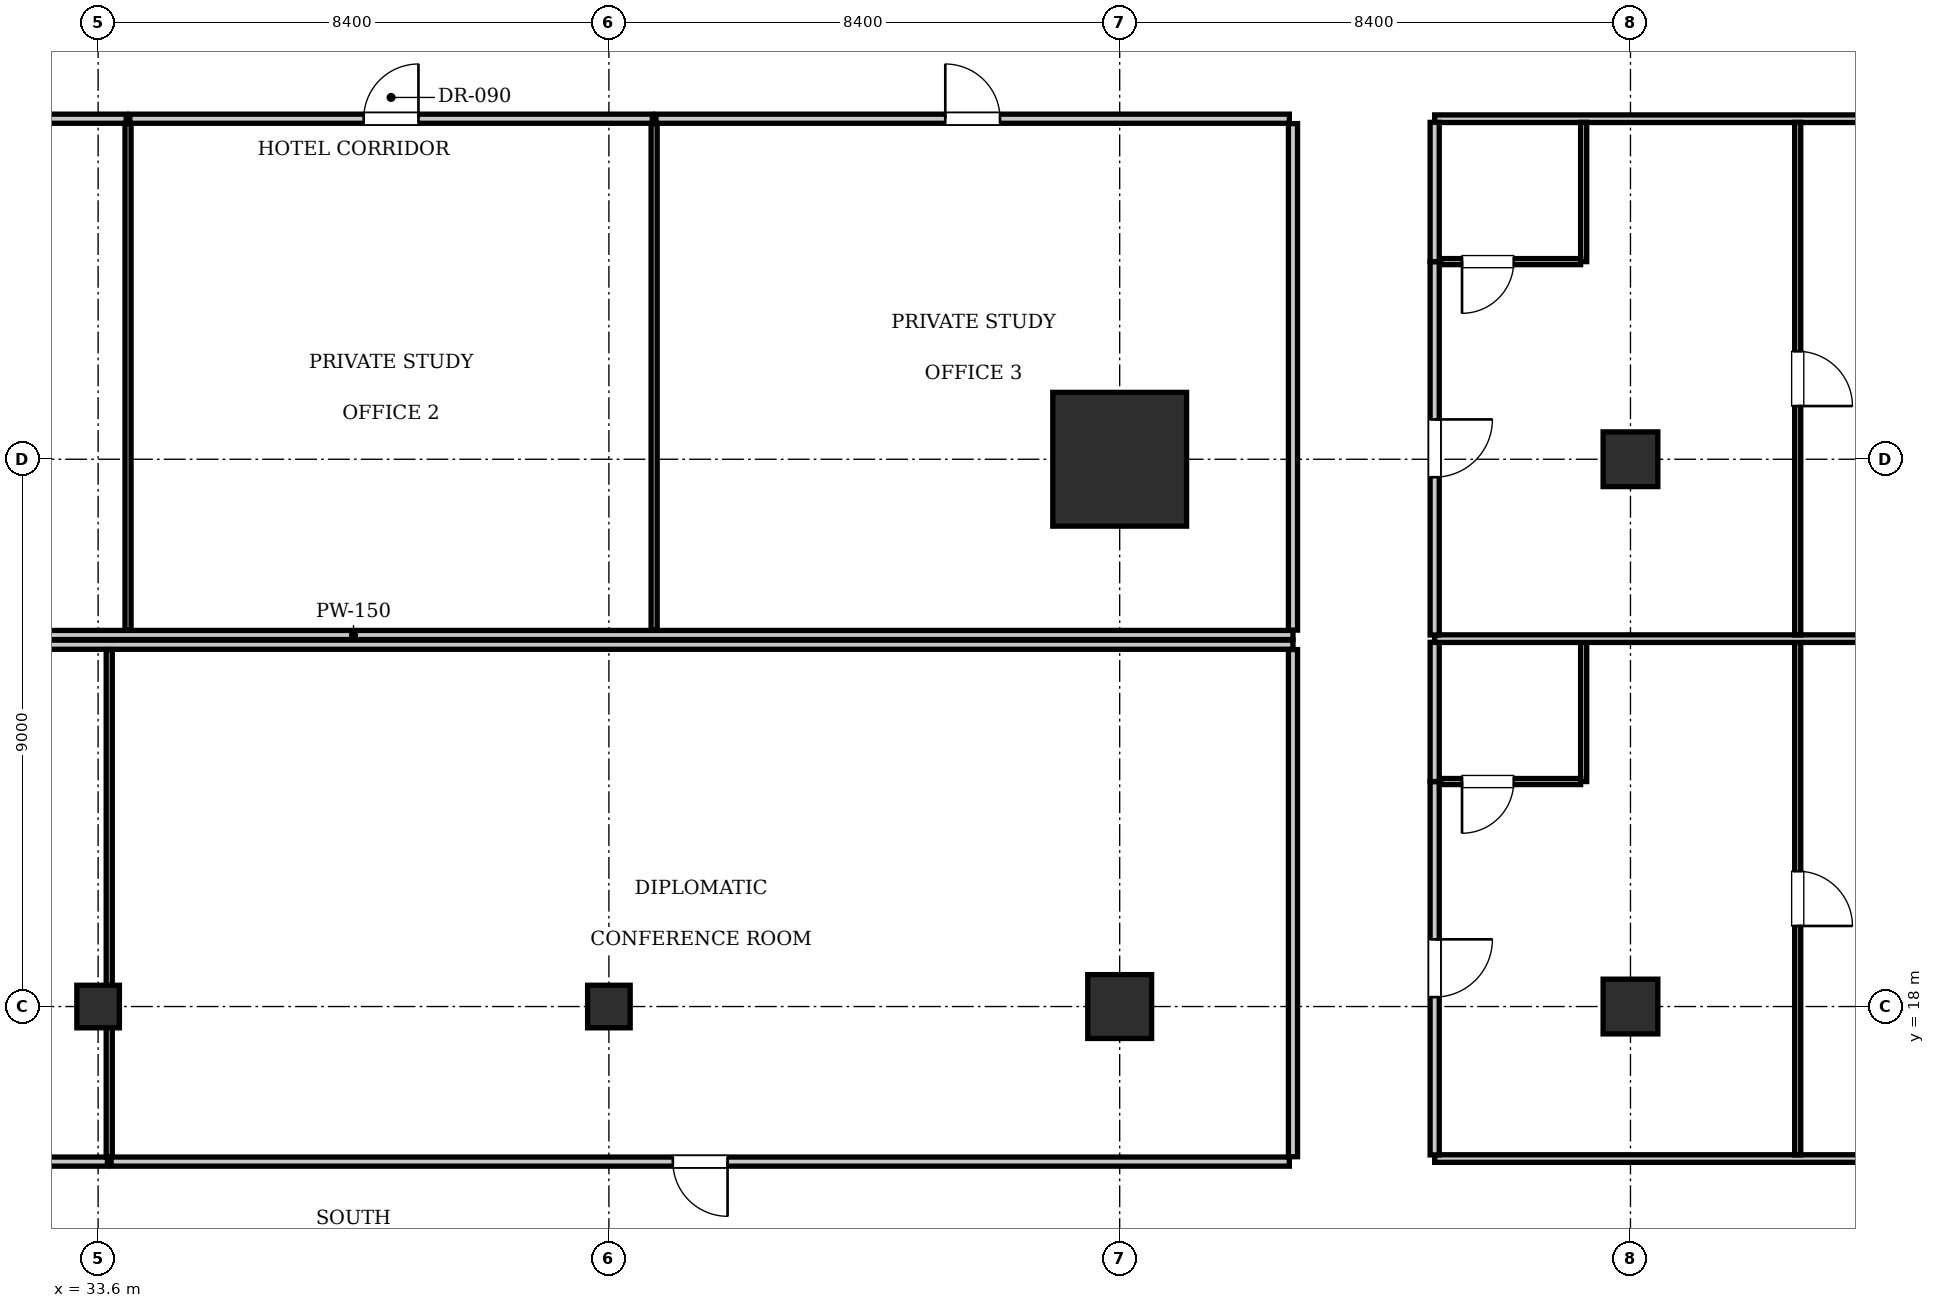
"""IFC4 building model, lengths in metres.
Left out: names, types, materials, properties, quantities, classifications, styles, units other than length and angle.
Written with IfcOpenShell. Run it as: python <this file> out.ifc"""

import sys

from ifc_helpers import new_model, si_unit, direction, frame, frame_2d, origin, origin_2d, place, context, subcontext, project, spatial, rectangle, i_section, extrude, element, fill, save


model = new_model("IFC4")
c1 = context("Model", 3, precision=1e-05, world=origin(), true_north=direction((0.0, 1.0)))
c2 = subcontext(c1, "Body", "Model", "MODEL_VIEW")
j1 = project(units=[si_unit("LENGTHUNIT", "METRE"), si_unit("PLANEANGLEUNIT", "RADIAN")], contexts=[c1])
p1 = place(None, origin())
s1 = spatial("IfcSite", under=j1, at=p1, CompositionType="ELEMENT")
p2 = place(p1, origin())
s2 = spatial("IfcBuilding", under=s1, at=p2, CompositionType="ELEMENT")
p3 = place(p2, frame((0.0, 0.0, 73.15)))
s3 = spatial("IfcBuildingStorey", under=s2, at=p3, CompositionType="ELEMENT", Elevation=73.15)
p4 = place(p3, frame((50.4, 27.0, 0.0), z_axis=(0.0, 0.0, 1.0), x_axis=(1.0, 0.0, 0.0)))
e1 = element("IfcColumn", 1, at=p4, inside=s3, PredefinedType="COLUMN", context=c2, shape_type="SweptSolid", body=[
    extrude(rectangle(XDim=2.2, YDim=2.2, at=origin_2d()), origin(), (0.0, 0.0, 1.0), 3.85),
])
p5 = place(p3, frame((50.4, 18.0, 0.0), z_axis=(0.0, 0.0, 1.0), x_axis=(1.0, 0.0, 0.0)))
e2 = element("IfcColumn", 2, at=p5, inside=s3, PredefinedType="COLUMN", context=c2, shape_type="SweptSolid", body=[
    extrude(rectangle(XDim=1.05, YDim=1.05, at=origin_2d()), origin(), (0.0, 0.0, 1.0), 3.85),
])
for number, where, z_axis, x_axis in (
    (3, (33.6, 18.0, 0.0), (0.0, 0.0, 1.0), (1.0, 0.0, 0.0)),
    (4, (42.0, 18.0, 0.0), (0.0, 0.0, 1.0), (1.0, 0.0, 0.0)),
):
    element("IfcColumn", number, at=place(p3, frame(where, z_axis=z_axis, x_axis=x_axis)), inside=s3, PredefinedType="COLUMN", context=c2, shape_type="SweptSolid", body=[
        extrude(i_section(OverallWidth=0.7, OverallDepth=0.7, WebThickness=0.028, FlangeThickness=0.044, at=origin_2d()), origin(), (0.0, 0.0, 1.0), 3.85),
    ])
for number, where, z_axis, x_axis in (
    (5, (58.8, 18.0, 0.0), (0.0, 0.0, 1.0), (1.0, 0.0, 0.0)),
    (6, (58.8, 27.0, 0.0), (0.0, 0.0, 1.0), (1.0, 0.0, 0.0)),
):
    element("IfcColumn", number, at=place(p3, frame(where, z_axis=z_axis, x_axis=x_axis)), inside=s3, PredefinedType="COLUMN", context=c2, shape_type="SweptSolid", body=[
        extrude(rectangle(XDim=0.9, YDim=0.9, at=origin_2d()), origin(), (0.0, 0.0, 1.0), 3.85),
    ])
p6 = place(p3, frame((22.35, 24.11, 0.0), z_axis=(0.0, 0.0, 1.0), x_axis=(1.0, 0.0, 0.0)))
e7 = element("IfcWall", 7, at=p6, inside=s3, PredefinedType="PARTITIONING", context=c2, shape_type="SweptSolid", body=[
    extrude(rectangle(XDim=30.9, YDim=0.15, at=frame_2d((15.45, 0.0))), origin(), (0.0, 0.0, 1.0), 3.61),
])
p7 = place(p3, frame((53.25, 24.19, 0.0), z_axis=(0.0, 0.0, 1.0), x_axis=(0.0, 1.0, 0.0)))
e8 = element("IfcWall", 8, at=p7, inside=s3, PredefinedType="PARTITIONING", context=c2, shape_type="SweptSolid", body=[
    extrude(rectangle(XDim=8.33, YDim=0.15, at=frame_2d((4.165, 0.0))), origin(), (0.0, 0.0, 1.0), 3.61),
])
p8 = place(p3, frame((27.324, 32.6, 0.0), z_axis=(0.0, 0.0, 1.0), x_axis=(1.0, 0.0, 0.0)))
e9 = element("IfcWall", 9, at=p8, inside=s3, PredefinedType="PARTITIONING", context=c2, shape_type="SweptSolid", body=[
    extrude(rectangle(XDim=6.738, YDim=0.15, at=frame_2d((3.369, 0.0))), origin(), (0.0, 0.0, 1.0), 3.61),
])
p9 = place(p8, frame((2.919, 0.0, 0.0)))
e10 = element("IfcOpeningElement", 10, at=p9, cuts=e9, PredefinedType="OPENING", context=c2, shape_type="SweptSolid", body=[
    extrude(rectangle(XDim=0.9, YDim=2.1, at=frame_2d((0.45, 1.05))), frame((0.0, 0.085, 0.0), z_axis=(0.0, -1.0, 0.0), x_axis=(1.0, 0.0, 0.0)), (0.0, 0.0, 1.0), 0.17),
])
p10 = place(p3, frame((34.092, 24.19, 0.0), z_axis=(0.0, 0.0, 1.0), x_axis=(0.0, 1.0, 0.0)))
e11 = element("IfcWall", 11, at=p10, inside=s3, PredefinedType="PARTITIONING", context=c2, shape_type="SweptSolid", body=[
    extrude(rectangle(XDim=8.33, YDim=0.1, at=frame_2d((4.165, 0.0))), origin(), (0.0, 0.0, 1.0), 3.61),
])
p11 = place(p3, frame((34.122, 32.6, 0.0), z_axis=(0.0, 0.0, 1.0), x_axis=(1.0, 0.0, 0.0)))
e12 = element("IfcWall", 12, at=p11, inside=s3, PredefinedType="PARTITIONING", context=c2, shape_type="SweptSolid", body=[
    extrude(rectangle(XDim=8.592, YDim=0.15, at=frame_2d((4.296, 0.0))), origin(), (0.0, 0.0, 1.0), 3.61),
])
p12 = place(p11, frame((3.846, 0.0, 0.0)))
e13 = element("IfcOpeningElement", 13, at=p12, cuts=e12, PredefinedType="OPENING", context=c2, shape_type="SweptSolid", body=[
    extrude(rectangle(XDim=0.9, YDim=2.1, at=frame_2d((0.45, 1.05))), frame((0.0, 0.085, 0.0), z_axis=(0.0, -1.0, 0.0), x_axis=(1.0, 0.0, 0.0)), (0.0, 0.0, 1.0), 0.17),
])
p13 = place(p3, frame((42.744, 24.19, 0.0), z_axis=(0.0, 0.0, 1.0), x_axis=(0.0, 1.0, 0.0)))
e14 = element("IfcWall", 14, at=p13, inside=s3, PredefinedType="PARTITIONING", context=c2, shape_type="SweptSolid", body=[
    extrude(rectangle(XDim=8.33, YDim=0.1, at=frame_2d((4.165, 0.0))), origin(), (0.0, 0.0, 1.0), 3.61),
])
p14 = place(p3, frame((42.774, 32.6, 0.0), z_axis=(0.0, 0.0, 1.0), x_axis=(1.0, 0.0, 0.0)))
e15 = element("IfcWall", 15, at=p14, inside=s3, PredefinedType="PARTITIONING", context=c2, shape_type="SweptSolid", body=[
    extrude(rectangle(XDim=10.416, YDim=0.15, at=frame_2d((5.208, 0.0))), origin(), (0.0, 0.0, 1.0), 3.61),
])
p15 = place(p14, frame((4.758, 0.0, 0.0)))
e16 = element("IfcOpeningElement", 16, at=p15, cuts=e15, PredefinedType="OPENING", context=c2, shape_type="SweptSolid", body=[
    extrude(rectangle(XDim=0.9, YDim=2.1, at=frame_2d((0.45, 1.05))), frame((0.0, 0.085, 0.0), z_axis=(0.0, -1.0, 0.0), x_axis=(1.0, 0.0, 0.0)), (0.0, 0.0, 1.0), 0.17),
])
p16 = place(p3, frame((22.35, 23.95, 0.0), z_axis=(0.0, 0.0, 1.0), x_axis=(1.0, 0.0, 0.0)))
e17 = element("IfcWall", 17, at=p16, inside=s3, PredefinedType="PARTITIONING", context=c2, shape_type="SweptSolid", body=[
    extrude(rectangle(XDim=30.9, YDim=0.15, at=frame_2d((15.45, 0.0))), origin(), (0.0, 0.0, 1.0), 3.61),
])
p17 = place(p3, frame((53.25, 15.53, 0.0), z_axis=(0.0, 0.0, 1.0), x_axis=(0.0, 1.0, 0.0)))
e18 = element("IfcWall", 18, at=p17, inside=s3, PredefinedType="PARTITIONING", context=c2, shape_type="SweptSolid", body=[
    extrude(rectangle(XDim=8.34, YDim=0.15, at=frame_2d((4.17, 0.0))), origin(), (0.0, 0.0, 1.0), 3.61),
])
p18 = place(p3, frame((22.41, 15.45, 0.0), z_axis=(0.0, 0.0, 1.0), x_axis=(1.0, 0.0, 0.0)))
e19 = element("IfcWall", 19, at=p18, inside=s3, PredefinedType="PARTITIONING", context=c2, shape_type="SweptSolid", body=[
    extrude(rectangle(XDim=11.343, YDim=0.15, at=frame_2d((5.671, 0.0))), origin(), (0.0, 0.0, 1.0), 3.61),
])
p19 = place(p18, frame((5.221, 0.0, 0.0)))
e20 = element("IfcOpeningElement", 20, at=p19, cuts=e19, PredefinedType="OPENING", context=c2, shape_type="SweptSolid", body=[
    extrude(rectangle(XDim=0.9, YDim=2.1, at=frame_2d((0.45, 1.05))), frame((0.0, 0.085, 0.0), z_axis=(0.0, -1.0, 0.0), x_axis=(1.0, 0.0, 0.0)), (0.0, 0.0, 1.0), 0.17),
])
p20 = place(p3, frame((33.783, 15.53, 0.0), z_axis=(0.0, 0.0, 1.0), x_axis=(0.0, 1.0, 0.0)))
e21 = element("IfcWall", 21, at=p20, inside=s3, PredefinedType="PARTITIONING", context=c2, shape_type="SweptSolid", body=[
    extrude(rectangle(XDim=8.34, YDim=0.1, at=frame_2d((4.17, 0.0))), origin(), (0.0, 0.0, 1.0), 2.999),
])
p21 = place(p3, frame((33.813, 15.45, 0.0), z_axis=(0.0, 0.0, 1.0), x_axis=(1.0, 0.0, 0.0)))
e22 = element("IfcWall", 22, at=p21, inside=s3, PredefinedType="PARTITIONING", context=c2, shape_type="SweptSolid", body=[
    extrude(rectangle(XDim=19.377, YDim=0.15, at=frame_2d((9.688, 0.0))), origin(), (0.0, 0.0, 1.0), 3.61),
])
p22 = place(p21, frame((9.239, 0.0, 0.0)))
e23 = element("IfcOpeningElement", 23, at=p22, cuts=e22, PredefinedType="OPENING", context=c2, shape_type="SweptSolid", body=[
    extrude(rectangle(XDim=0.9, YDim=2.1, at=frame_2d((0.45, 1.05))), frame((0.0, 0.085, 0.0), z_axis=(0.0, -1.0, 0.0), x_axis=(1.0, 0.0, 0.0)), (0.0, 0.0, 1.0), 0.17),
])
for number, where, z_axis, x_axis in (
    (24, (55.58, 15.5, 0.0), (0.0, 0.0, 1.0), (1.0, 0.0, 0.0)),
    (25, (55.58, 32.6, 0.0), (0.0, 0.0, 1.0), (1.0, 0.0, 0.0)),
):
    element("IfcWall", number, at=place(p3, frame(where, z_axis=z_axis, x_axis=x_axis)), inside=s3, PredefinedType="PARTITIONING", context=c2, shape_type="SweptSolid", body=[
        extrude(rectangle(XDim=9.12, YDim=0.125, at=frame_2d((4.56, 0.0))), origin(), (0.0, 0.0, 1.0), 3.61),
    ])
p23 = place(p3, frame((55.58, 15.56, 0.0), z_axis=(0.0, 0.0, 1.0), x_axis=(0.0, 1.0, 0.0)))
e26 = element("IfcWall", 26, at=p23, inside=s3, PredefinedType="PARTITIONING", context=c2, shape_type="SweptSolid", body=[
    extrude(rectangle(XDim=6.14, YDim=0.15, at=frame_2d((3.07, 0.0))), origin(), (0.0, 0.0, 1.0), 3.61),
])
p24 = place(p23, frame((2.595, 0.0, 0.0)))
e27 = element("IfcOpeningElement", 27, at=p24, cuts=e26, PredefinedType="OPENING", context=c2, shape_type="SweptSolid", body=[
    extrude(rectangle(XDim=0.95, YDim=2.15, at=frame_2d((0.475, 1.075))), frame((0.0, 0.085, 0.0), z_axis=(0.0, -1.0, 0.0), x_axis=(1.0, 0.0, 0.0)), (0.0, 0.0, 1.0), 0.17),
])
p25 = place(p3, frame((55.58, 21.7, 0.0), z_axis=(0.0, 0.0, 1.0), x_axis=(0.0, 1.0, 0.0)))
e28 = element("IfcWall", 28, at=p25, inside=s3, PredefinedType="PARTITIONING", context=c2, shape_type="SweptSolid", body=[
    extrude(rectangle(XDim=2.29, YDim=0.15, at=frame_2d((1.145, 0.0))), origin(), (0.0, 0.0, 1.0), 3.61),
])
p26 = place(p3, frame((58.03, 21.7, 0.0), z_axis=(0.0, 0.0, 1.0), x_axis=(0.0, 1.0, 0.0)))
e29 = element("IfcWall", 29, at=p26, inside=s3, PredefinedType="PARTITIONING", context=c2, shape_type="SweptSolid", body=[
    extrude(rectangle(XDim=2.29, YDim=0.1, at=frame_2d((1.145, 0.0))), origin(), (0.0, 0.0, 1.0), 3.61),
])
p27 = place(p3, frame((55.68, 21.7, 0.0), z_axis=(0.0, 0.0, 1.0), x_axis=(1.0, 0.0, 0.0)))
e30 = element("IfcWall", 30, at=p27, inside=s3, PredefinedType="PARTITIONING", context=c2, shape_type="SweptSolid", body=[
    extrude(rectangle(XDim=2.3, YDim=0.1, at=frame_2d((1.15, 0.0))), origin(), (0.0, 0.0, 1.0), 3.61),
])
p28 = place(p27, frame((0.35, 0.0, 0.0)))
e31 = element("IfcOpeningElement", 31, at=p28, cuts=e30, PredefinedType="OPENING", context=c2, shape_type="SweptSolid", body=[
    extrude(rectangle(XDim=0.85, YDim=2.1, at=frame_2d((0.425, 1.05))), frame((0.0, 0.06, 0.0), z_axis=(0.0, -1.0, 0.0), x_axis=(1.0, 0.0, 0.0)), (0.0, 0.0, 1.0), 0.12),
])
p29 = place(p3, frame((61.55, 15.56, 0.0), z_axis=(0.0, 0.0, 1.0), x_axis=(0.0, 1.0, 0.0)))
e32 = element("IfcWall", 32, at=p29, inside=s3, PredefinedType="PARTITIONING", context=c2, shape_type="SweptSolid", body=[
    extrude(rectangle(XDim=8.43, YDim=0.1, at=frame_2d((4.215, 0.0))), origin(), (0.0, 0.0, 1.0), 3.207),
])
p30 = place(p29, frame((3.765, 0.0, 0.0)))
e33 = element("IfcOpeningElement", 33, at=p30, cuts=e32, PredefinedType="OPENING", context=c2, shape_type="SweptSolid", body=[
    extrude(rectangle(XDim=0.9, YDim=2.1, at=frame_2d((0.45, 1.05))), frame((0.0, 0.06, 0.0), z_axis=(0.0, -1.0, 0.0), x_axis=(1.0, 0.0, 0.0)), (0.0, 0.0, 1.0), 0.12),
])
p31 = place(p3, frame((55.58, 24.05, 0.0), z_axis=(0.0, 0.0, 1.0), x_axis=(1.0, 0.0, 0.0)))
e34 = element("IfcWall", 34, at=p31, inside=s3, PredefinedType="PARTITIONING", context=c2, shape_type="SweptSolid", body=[
    extrude(rectangle(XDim=9.12, YDim=0.125, at=frame_2d((4.56, 0.0))), origin(), (0.0, 0.0, 1.0), 3.61),
])
p32 = place(p3, frame((55.58, 24.11, 0.0), z_axis=(0.0, 0.0, 1.0), x_axis=(0.0, 1.0, 0.0)))
e35 = element("IfcWall", 35, at=p32, inside=s3, PredefinedType="PARTITIONING", context=c2, shape_type="SweptSolid", body=[
    extrude(rectangle(XDim=6.14, YDim=0.15, at=frame_2d((3.07, 0.0))), origin(), (0.0, 0.0, 1.0), 3.61),
])
p33 = place(p32, frame((2.595, 0.0, 0.0)))
e36 = element("IfcOpeningElement", 36, at=p33, cuts=e35, PredefinedType="OPENING", context=c2, shape_type="SweptSolid", body=[
    extrude(rectangle(XDim=0.95, YDim=2.15, at=frame_2d((0.475, 1.075))), frame((0.0, 0.085, 0.0), z_axis=(0.0, -1.0, 0.0), x_axis=(1.0, 0.0, 0.0)), (0.0, 0.0, 1.0), 0.17),
])
p34 = place(p3, frame((55.58, 30.25, 0.0), z_axis=(0.0, 0.0, 1.0), x_axis=(0.0, 1.0, 0.0)))
e37 = element("IfcWall", 37, at=p34, inside=s3, PredefinedType="PARTITIONING", context=c2, shape_type="SweptSolid", body=[
    extrude(rectangle(XDim=2.29, YDim=0.15, at=frame_2d((1.145, 0.0))), origin(), (0.0, 0.0, 1.0), 3.61),
])
p35 = place(p3, frame((58.03, 30.25, 0.0), z_axis=(0.0, 0.0, 1.0), x_axis=(0.0, 1.0, 0.0)))
e38 = element("IfcWall", 38, at=p35, inside=s3, PredefinedType="PARTITIONING", context=c2, shape_type="SweptSolid", body=[
    extrude(rectangle(XDim=2.29, YDim=0.1, at=frame_2d((1.145, 0.0))), origin(), (0.0, 0.0, 1.0), 3.61),
])
p36 = place(p3, frame((55.68, 30.25, 0.0), z_axis=(0.0, 0.0, 1.0), x_axis=(1.0, 0.0, 0.0)))
e39 = element("IfcWall", 39, at=p36, inside=s3, PredefinedType="PARTITIONING", context=c2, shape_type="SweptSolid", body=[
    extrude(rectangle(XDim=2.3, YDim=0.1, at=frame_2d((1.15, 0.0))), origin(), (0.0, 0.0, 1.0), 3.61),
])
p37 = place(p36, frame((0.35, 0.0, 0.0)))
e40 = element("IfcOpeningElement", 40, at=p37, cuts=e39, PredefinedType="OPENING", context=c2, shape_type="SweptSolid", body=[
    extrude(rectangle(XDim=0.85, YDim=2.1, at=frame_2d((0.425, 1.05))), frame((0.0, 0.06, 0.0), z_axis=(0.0, -1.0, 0.0), x_axis=(1.0, 0.0, 0.0)), (0.0, 0.0, 1.0), 0.12),
])
p38 = place(p3, frame((61.55, 24.11, 0.0), z_axis=(0.0, 0.0, 1.0), x_axis=(0.0, 1.0, 0.0)))
e41 = element("IfcWall", 41, at=p38, inside=s3, PredefinedType="PARTITIONING", context=c2, shape_type="SweptSolid", body=[
    extrude(rectangle(XDim=8.43, YDim=0.1, at=frame_2d((4.215, 0.0))), origin(), (0.0, 0.0, 1.0), 3.207),
])
p39 = place(p38, frame((3.765, 0.0, 0.0)))
e42 = element("IfcOpeningElement", 42, at=p39, cuts=e41, PredefinedType="OPENING", context=c2, shape_type="SweptSolid", body=[
    extrude(rectangle(XDim=0.9, YDim=2.1, at=frame_2d((0.45, 1.05))), frame((0.0, 0.06, 0.0), z_axis=(0.0, -1.0, 0.0), x_axis=(1.0, 0.0, 0.0)), (0.0, 0.0, 1.0), 0.12),
])
p40 = place(p12, origin())
e43 = element("IfcDoor", 43, at=p40, inside=s3, OperationType="SINGLE_SWING_RIGHT", PredefinedType="DOOR", context=c2, shape_type="SweptSolid", body=[
    extrude(rectangle(XDim=0.9, YDim=2.1, at=frame_2d((0.45, 1.05))), frame((0.0, 0.025, 0.0), z_axis=(0.0, -1.0, 0.0), x_axis=(1.0, 0.0, 0.0)), (0.0, 0.0, 1.0), 0.05),
])
fill(e13, e43)
p41 = place(p15, origin())
e44 = element("IfcDoor", 44, at=p41, inside=s3, OperationType="SINGLE_SWING_LEFT", PredefinedType="DOOR", context=c2, shape_type="SweptSolid", body=[
    extrude(rectangle(XDim=0.9, YDim=2.1, at=frame_2d((0.45, 1.05))), frame((0.0, 0.025, 0.0), z_axis=(0.0, -1.0, 0.0), x_axis=(1.0, 0.0, 0.0)), (0.0, 0.0, 1.0), 0.05),
])
fill(e16, e44)
p42 = place(p22, frame((0.9, 0.0, 0.0), z_axis=(0.0, 0.0, 1.0), x_axis=(-1.0, 0.0, 0.0)))
e45 = element("IfcDoor", 45, at=p42, inside=s3, OperationType="SINGLE_SWING_LEFT", PredefinedType="DOOR", context=c2, shape_type="SweptSolid", body=[
    extrude(rectangle(XDim=0.9, YDim=2.1, at=frame_2d((0.45, 1.05))), frame((0.0, 0.025, 0.0), z_axis=(0.0, -1.0, 0.0), x_axis=(1.0, 0.0, 0.0)), (0.0, 0.0, 1.0), 0.05),
])
fill(e23, e45)
p43 = place(p28, frame((0.85, 0.0, 0.0), z_axis=(0.0, 0.0, 1.0), x_axis=(-1.0, 0.0, 0.0)))
e46 = element("IfcDoor", 46, at=p43, inside=s3, OperationType="SINGLE_SWING_RIGHT", PredefinedType="DOOR", context=c2, shape_type="SweptSolid", body=[
    extrude(rectangle(XDim=0.85, YDim=2.1, at=frame_2d((0.425, 1.05))), frame((0.0, 0.025, 0.0), z_axis=(0.0, -1.0, 0.0), x_axis=(1.0, 0.0, 0.0)), (0.0, 0.0, 1.0), 0.05),
])
fill(e31, e46)
p44 = place(p24, frame((0.95, 0.0, 0.0), z_axis=(0.0, 0.0, 1.0), x_axis=(-1.0, 0.0, 0.0)))
e47 = element("IfcDoor", 47, at=p44, inside=s3, OperationType="SINGLE_SWING_LEFT", PredefinedType="DOOR", context=c2, shape_type="SweptSolid", body=[
    extrude(rectangle(XDim=0.95, YDim=2.15, at=frame_2d((0.475, 1.075))), frame((0.0, 0.025, 0.0), z_axis=(0.0, -1.0, 0.0), x_axis=(1.0, 0.0, 0.0)), (0.0, 0.0, 1.0), 0.05),
])
fill(e27, e47)
p45 = place(p30, frame((0.9, 0.0, 0.0), z_axis=(0.0, 0.0, 1.0), x_axis=(-1.0, 0.0, 0.0)))
e48 = element("IfcDoor", 48, at=p45, inside=s3, OperationType="SINGLE_SWING_RIGHT", PredefinedType="DOOR", context=c2, shape_type="SweptSolid", body=[
    extrude(rectangle(XDim=0.9, YDim=2.1, at=frame_2d((0.45, 1.05))), frame((0.0, 0.025, 0.0), z_axis=(0.0, -1.0, 0.0), x_axis=(1.0, 0.0, 0.0)), (0.0, 0.0, 1.0), 0.05),
])
fill(e33, e48)
p46 = place(p37, frame((0.85, 0.0, 0.0), z_axis=(0.0, 0.0, 1.0), x_axis=(-1.0, 0.0, 0.0)))
e49 = element("IfcDoor", 49, at=p46, inside=s3, OperationType="SINGLE_SWING_RIGHT", PredefinedType="DOOR", context=c2, shape_type="SweptSolid", body=[
    extrude(rectangle(XDim=0.85, YDim=2.1, at=frame_2d((0.425, 1.05))), frame((0.0, 0.025, 0.0), z_axis=(0.0, -1.0, 0.0), x_axis=(1.0, 0.0, 0.0)), (0.0, 0.0, 1.0), 0.05),
])
fill(e40, e49)
p47 = place(p33, frame((0.95, 0.0, 0.0), z_axis=(0.0, 0.0, 1.0), x_axis=(-1.0, 0.0, 0.0)))
e50 = element("IfcDoor", 50, at=p47, inside=s3, OperationType="SINGLE_SWING_LEFT", PredefinedType="DOOR", context=c2, shape_type="SweptSolid", body=[
    extrude(rectangle(XDim=0.95, YDim=2.15, at=frame_2d((0.475, 1.075))), frame((0.0, 0.025, 0.0), z_axis=(0.0, -1.0, 0.0), x_axis=(1.0, 0.0, 0.0)), (0.0, 0.0, 1.0), 0.05),
])
fill(e36, e50)
p48 = place(p39, frame((0.9, 0.0, 0.0), z_axis=(0.0, 0.0, 1.0), x_axis=(-1.0, 0.0, 0.0)))
e51 = element("IfcDoor", 51, at=p48, inside=s3, OperationType="SINGLE_SWING_RIGHT", PredefinedType="DOOR", context=c2, shape_type="SweptSolid", body=[
    extrude(rectangle(XDim=0.9, YDim=2.1, at=frame_2d((0.45, 1.05))), frame((0.0, 0.025, 0.0), z_axis=(0.0, -1.0, 0.0), x_axis=(1.0, 0.0, 0.0)), (0.0, 0.0, 1.0), 0.05),
])
fill(e42, e51)
save(model, sys.argv[1])
